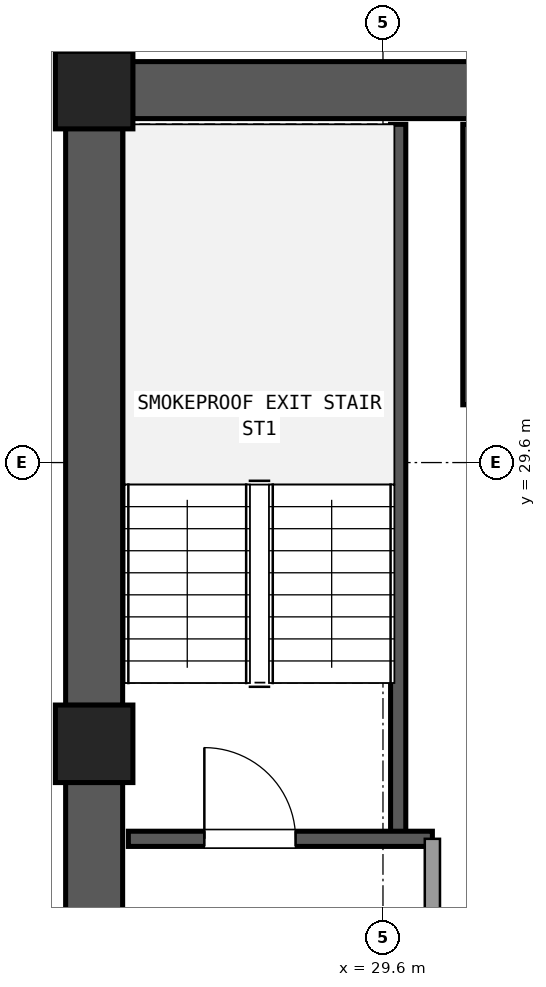
"""IFC4 building model, lengths in metres.
Left out: names, types, materials, properties, quantities, classifications, styles, units other than length and angle.
Written with IfcOpenShell. Run it as: python <this file> out.ifc"""

import sys

from ifc_helpers import new_model, si_unit, direction, frame, frame_2d, origin, origin_2d, place, context, subcontext, project, spatial, rectangle, extrude, element, fill, save


model = new_model("IFC4")
c1 = context("Model", 3, precision=1e-05, world=origin(), true_north=direction((0.0, 1.0)))
c2 = subcontext(c1, "Body", "Model", "MODEL_VIEW")
j1 = project(units=[si_unit("LENGTHUNIT", "METRE"), si_unit("PLANEANGLEUNIT", "RADIAN")], contexts=[c1])
p1 = place(None, origin())
s1 = spatial("IfcSite", under=j1, at=p1, CompositionType="ELEMENT")
p2 = place(p1, origin())
s2 = spatial("IfcBuilding", under=s1, at=p2, CompositionType="ELEMENT")
p3 = place(p2, frame((0.0, 0.0, 174.42)))
s3 = spatial("IfcBuildingStorey", under=s2, at=p3, CompositionType="ELEMENT", Elevation=174.42)
for number, where, z_axis, x_axis in (
    (1, (25.8, 34.5, 0.0), (0.0, 0.0, 1.0), (1.0, 0.0, 0.0)),
    (2, (25.8, 25.9, 0.0), (0.0, 0.0, 1.0), (1.0, 0.0, 0.0)),
):
    element("IfcColumn", number, at=place(p3, frame(where, z_axis=z_axis, x_axis=x_axis)), inside=s3, PredefinedType="COLUMN", context=c2, shape_type="SweptSolid", body=[
        extrude(rectangle(XDim=1.02, YDim=1.02, at=origin_2d()), origin(), (0.0, 0.0, 1.0), 3.6),
    ])
p4 = place(p3, frame((36.495, 34.5, 0.0), z_axis=(0.0, 0.0, 1.0), x_axis=(-1.0, 0.0, 0.0)))
e3 = element("IfcWall", 3, at=p4, inside=s3, PredefinedType="SHEAR", context=c2, shape_type="SweptSolid", body=[
    extrude(rectangle(XDim=10.19, YDim=0.75, at=frame_2d((5.095, 0.0))), origin(), (0.0, 0.0, 1.0), 3.3),
])
p5 = place(p4, frame((4.095, 0.0, 0.0)))
e4 = element("IfcOpeningElement", 4, at=p5, cuts=e3, PredefinedType="OPENING", context=c2, shape_type="SweptSolid", body=[
    extrude(rectangle(XDim=1.2, YDim=2.15, at=frame_2d((0.6, 1.075))), frame((0.0, 0.385, 0.0), z_axis=(0.0, -1.0, 0.0), x_axis=(1.0, 0.0, 0.0)), (0.0, 0.0, 1.0), 0.77),
])
p6 = place(p3, frame((25.8, 33.995, 0.0), z_axis=(0.0, 0.0, 1.0), x_axis=(0.0, -1.0, 0.0)))
e5 = element("IfcWall", 5, at=p6, inside=s3, PredefinedType="SHEAR", context=c2, shape_type="SweptSolid", body=[
    extrude(rectangle(XDim=7.59, YDim=0.75, at=frame_2d((3.795, 0.0))), origin(), (0.0, 0.0, 1.0), 3.3),
])
p7 = place(p3, frame((25.8, 25.395, 0.0), z_axis=(0.0, 0.0, 1.0), x_axis=(0.0, -1.0, 0.0)))
e6 = element("IfcWall", 6, at=p7, inside=s3, PredefinedType="SHEAR", context=c2, shape_type="SweptSolid", body=[
    extrude(rectangle(XDim=7.59, YDim=0.75, at=frame_2d((3.795, 0.0))), origin(), (0.0, 0.0, 1.0), 3.3),
])
p8 = place(p7, frame((2.145, 0.0, 0.0)))
e7 = element("IfcOpeningElement", 7, at=p8, cuts=e6, PredefinedType="OPENING", context=c2, shape_type="SweptSolid", body=[
    extrude(rectangle(XDim=1.2, YDim=2.15, at=frame_2d((0.6, 1.075))), frame((0.0, 0.385, 0.0), z_axis=(0.0, -1.0, 0.0), x_axis=(1.0, 0.0, 0.0)), (0.0, 0.0, 1.0), 0.77),
])
p9 = place(p3, frame((29.8, 24.65, 0.0), z_axis=(0.0, 0.0, 1.0), x_axis=(0.0, 1.0, 0.0)))
e8 = element("IfcWall", 8, at=p9, inside=s3, PredefinedType="SHEAR", context=c2, shape_type="SweptSolid", body=[
    extrude(rectangle(XDim=9.4, YDim=0.2, at=frame_2d((4.7, 0.0))), origin(), (0.0, 0.0, 1.0), 3.3),
])
p10 = place(p3, frame((26.25, 24.65, 0.0), z_axis=(0.0, 0.0, 1.0), x_axis=(1.0, 0.0, 0.0)))
e9 = element("IfcWall", 9, at=p10, inside=s3, PredefinedType="SHEAR", context=c2, shape_type="SweptSolid", body=[
    extrude(rectangle(XDim=4.0, YDim=0.2, at=frame_2d((2.0, 0.0))), origin(), (0.0, 0.0, 1.0), 3.3),
])
p11 = place(p10, frame((1.0, 0.0, 0.0)))
e10 = element("IfcOpeningElement", 10, at=p11, cuts=e9, PredefinedType="OPENING", context=c2, shape_type="SweptSolid", body=[
    extrude(rectangle(XDim=1.2, YDim=2.15, at=frame_2d((0.6, 1.075))), frame((0.0, 0.11, 0.0), z_axis=(0.0, -1.0, 0.0), x_axis=(1.0, 0.0, 0.0)), (0.0, 0.0, 1.0), 0.22),
])
p12 = place(p3, frame((30.75, 30.36, 0.0), z_axis=(0.0, 0.0, 1.0), x_axis=(0.0, 1.0, 0.0)))
e11 = element("IfcWall", 11, at=p12, inside=s3, PredefinedType="SHEAR", context=c2, shape_type="SweptSolid", body=[
    extrude(rectangle(XDim=3.69, YDim=0.2, at=frame_2d((1.845, 0.0))), origin(), (0.0, 0.0, 1.0), 3.3),
])
p13 = place(p3, frame((30.25, 17.75, 0.0), z_axis=(0.0, 0.0, 1.0), x_axis=(0.0, 1.0, 0.0)))
e12 = element("IfcWall", 12, at=p13, inside=s3, PredefinedType="SOLIDWALL", context=c2, shape_type="SweptSolid", body=[
    extrude(rectangle(XDim=6.9, YDim=0.2, at=frame_2d((3.45, 0.0))), origin(), (0.0, 0.0, 1.0), 2.59),
])
p14 = place(p13, frame((4.15, 0.0, 0.0)))
e13 = element("IfcOpeningElement", 13, at=p14, cuts=e12, PredefinedType="OPENING", context=c2, shape_type="SweptSolid", body=[
    extrude(rectangle(XDim=1.2, YDim=2.15, at=frame_2d((0.6, 1.075))), frame((0.0, 0.11, 0.0), z_axis=(0.0, -1.0, 0.0), x_axis=(1.0, 0.0, 0.0)), (0.0, 0.0, 1.0), 0.22),
])
p15 = place(p11, origin())
e14 = element("IfcDoor", 14, at=p15, inside=s3, OperationType="SINGLE_SWING_LEFT", PredefinedType="DOOR", context=c2, shape_type="SweptSolid", body=[
    extrude(rectangle(XDim=1.2, YDim=2.15, at=frame_2d((0.6, 1.075))), frame((0.0, 0.025, 0.0), z_axis=(0.0, -1.0, 0.0), x_axis=(1.0, 0.0, 0.0)), (0.0, 0.0, 1.0), 0.05),
])
fill(e10, e14)
save(model, sys.argv[1])
